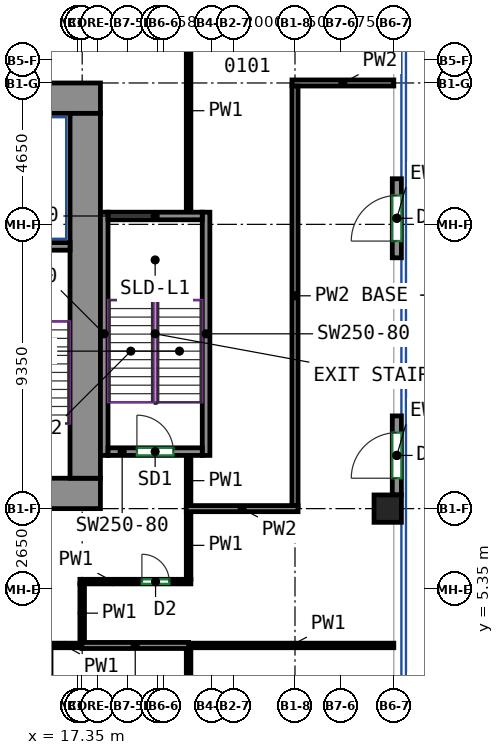
"""IFC4 building model, lengths in metres.
Left out: names, types, materials, properties, quantities, classifications, styles, units other than length and angle.
Written with IfcOpenShell. Run it as: python <this file> out.ifc"""

import sys

from ifc_helpers import new_model, si_unit, direction, frame, frame_2d, origin, origin_2d, place, context, subcontext, project, spatial, rectangle, extrude, source, transform, mapped, element, fill, save


model = new_model("IFC4")
c1 = context("Model", 3, precision=1e-05, world=origin(), true_north=direction((0.0, 1.0)))
c2 = subcontext(c1, "Body", "Model", "MODEL_VIEW")
j1 = project(units=[si_unit("LENGTHUNIT", "METRE"), si_unit("PLANEANGLEUNIT", "RADIAN")], contexts=[c1])
p1 = place(None, origin())
s1 = spatial("IfcSite", under=j1, at=p1, CompositionType="ELEMENT")
p2 = place(p1, origin())
s2 = spatial("IfcBuilding", under=s1, at=p2, CompositionType="ELEMENT")
p3 = place(p2, frame((0.0, 0.0, 9.0)))
s3 = spatial("IfcBuildingStorey", under=s2, at=p3, CompositionType="ELEMENT", Elevation=9.0)
m1 = source(origin(), c2, "Body", "SweptSolid", [
    extrude(rectangle(XDim=0.9, YDim=0.9, at=origin_2d()), origin(), (0.0, 0.0, 1.0), 4.1),
])
p4 = place(p3, frame((27.55, 8.0, 0.0), z_axis=(0.0, 0.0, 1.0), x_axis=(1.0, 0.0, 0.0)))
e1 = element("IfcColumn", 1, at=p4, inside=s3, PredefinedType="COLUMN", context=c2, shape_type="MappedRepresentation", body=[
    mapped(m1, transform((0.0, 0.0, 0.0))),
])
m2 = source(origin(), c2, "Body", "SweptSolid", [
    extrude(rectangle(XDim=5.63, YDim=1.0, at=frame_2d((2.815, 0.0))), origin(), (0.0, 0.0, 1.0), 4.1),
])
p5 = place(p3, frame((12.47, 8.5, 0.0), z_axis=(0.0, 0.0, 1.0), x_axis=(1.0, 0.0, 0.0)))
e2 = element("IfcWall", 2, at=p5, inside=s3, PredefinedType="SHEAR", context=c2, shape_type="MappedRepresentation", body=[
    mapped(m2, transform((0.0, 0.0, 0.0))),
])
p6 = place(p5, frame((2.18, 0.0, 0.0)))
e3 = element("IfcOpeningElement", 3, at=p6, cuts=e2, PredefinedType="OPENING", context=c2, shape_type="SweptSolid", body=[
    extrude(rectangle(XDim=1.2, YDim=2.1, at=frame_2d((0.6, 1.05))), frame((0.0, 0.51, 0.0), z_axis=(0.0, -1.0, 0.0), x_axis=(1.0, 0.0, 0.0)), (0.0, 0.0, 1.0), 1.02),
])
m3 = source(origin(), c2, "Body", "SweptSolid", [
    extrude(rectangle(XDim=34.1, YDim=1.0, at=frame_2d((17.05, 0.0))), origin(), (0.0, 0.0, 1.0), 4.1),
])
p7 = place(p3, frame((-16.0, 21.5, 0.0), z_axis=(0.0, 0.0, 1.0), x_axis=(1.0, 0.0, 0.0)))
e4 = element("IfcWall", 4, at=p7, inside=s3, PredefinedType="SHEAR", context=c2, shape_type="MappedRepresentation", body=[
    mapped(m3, transform((0.0, 0.0, 0.0))),
])
p8 = place(p7, frame((6.831, 0.0, 0.0)))
e5 = element("IfcOpeningElement", 5, at=p8, cuts=e4, PredefinedType="OPENING", context=c2, shape_type="SweptSolid", body=[
    extrude(rectangle(XDim=0.9, YDim=2.1, at=frame_2d((0.45, 1.05))), frame((0.0, 0.51, 0.0), z_axis=(0.0, -1.0, 0.0), x_axis=(1.0, 0.0, 0.0)), (0.0, 0.0, 1.0), 1.02),
])
p9 = place(p7, frame((12.138, 0.0, 0.0)))
e6 = element("IfcOpeningElement", 6, at=p9, cuts=e4, PredefinedType="OPENING", context=c2, shape_type="SweptSolid", body=[
    extrude(rectangle(XDim=0.9, YDim=2.1, at=frame_2d((0.45, 1.05))), frame((0.0, 0.51, 0.0), z_axis=(0.0, -1.0, 0.0), x_axis=(1.0, 0.0, 0.0)), (0.0, 0.0, 1.0), 1.02),
])
p10 = place(p7, frame((17.565, 0.0, 0.0)))
e7 = element("IfcOpeningElement", 7, at=p10, cuts=e4, PredefinedType="OPENING", context=c2, shape_type="SweptSolid", body=[
    extrude(rectangle(XDim=0.9, YDim=2.1, at=frame_2d((0.45, 1.05))), frame((0.0, 0.51, 0.0), z_axis=(0.0, -1.0, 0.0), x_axis=(1.0, 0.0, 0.0)), (0.0, 0.0, 1.0), 1.02),
])
p11 = place(p7, frame((21.786, 0.0, 0.0)))
e8 = element("IfcOpeningElement", 8, at=p11, cuts=e4, PredefinedType="OPENING", context=c2, shape_type="SweptSolid", body=[
    extrude(rectangle(XDim=0.9, YDim=2.1, at=frame_2d((0.45, 1.05))), frame((0.0, 0.51, 0.0), z_axis=(0.0, -1.0, 0.0), x_axis=(1.0, 0.0, 0.0)), (0.0, 0.0, 1.0), 1.02),
])
p12 = place(p7, frame((26.127, 0.0, 0.0)))
e9 = element("IfcOpeningElement", 9, at=p12, cuts=e4, PredefinedType="OPENING", context=c2, shape_type="SweptSolid", body=[
    extrude(rectangle(XDim=0.9, YDim=2.1, at=frame_2d((0.45, 1.05))), frame((0.0, 0.51, 0.0), z_axis=(0.0, -1.0, 0.0), x_axis=(1.0, 0.0, 0.0)), (0.0, 0.0, 1.0), 1.02),
])
p13 = place(p7, frame((2.525, 0.0, 0.0)))
e10 = element("IfcOpeningElement", 10, at=p13, cuts=e4, PredefinedType="OPENING", context=c2, shape_type="SweptSolid", body=[
    extrude(rectangle(XDim=0.9, YDim=2.1, at=frame_2d((0.45, 1.05))), frame((0.0, 0.51, 0.0), z_axis=(0.0, -1.0, 0.0), x_axis=(1.0, 0.0, 0.0)), (0.0, 0.0, 1.0), 1.02),
])
p14 = place(p7, frame((30.675, 0.0, 0.0)))
e11 = element("IfcOpeningElement", 11, at=p14, cuts=e4, PredefinedType="OPENING", context=c2, shape_type="SweptSolid", body=[
    extrude(rectangle(XDim=0.9, YDim=2.1, at=frame_2d((0.45, 1.05))), frame((0.0, 0.51, 0.0), z_axis=(0.0, -1.0, 0.0), x_axis=(1.0, 0.0, 0.0)), (0.0, 0.0, 1.0), 1.02),
])
m4 = source(origin(), c2, "Body", "SweptSolid", [
    extrude(rectangle(XDim=12.0, YDim=1.0, at=frame_2d((6.0, 0.0))), origin(), (0.0, 0.0, 1.0), 4.1),
])
p15 = place(p3, frame((17.6, 9.0, 0.0), z_axis=(0.0, 0.0, 1.0), x_axis=(0.0, 1.0, 0.0)))
e12 = element("IfcWall", 12, at=p15, inside=s3, PredefinedType="SHEAR", context=c2, shape_type="MappedRepresentation", body=[
    mapped(m4, transform((0.0, 0.0, 0.0))),
])
m5 = source(origin(), c2, "Body", "SweptSolid", [
    extrude(rectangle(XDim=3.7, YDim=0.25, at=frame_2d((1.85, 0.0))), origin(), (0.0, 0.0, 1.0), 4.1),
])
p16 = place(p3, frame((13.4, 16.625, 0.0), z_axis=(0.0, 0.0, 1.0), x_axis=(1.0, 0.0, 0.0)))
e13 = element("IfcWall", 13, at=p16, inside=s3, PredefinedType="SHEAR", context=c2, shape_type="MappedRepresentation", body=[
    mapped(m5, transform((0.0, 0.0, 0.0))),
])
m6 = source(origin(), c2, "Body", "SweptSolid", [
    extrude(rectangle(XDim=8.0, YDim=0.25, at=frame_2d((4.0, 0.0))), origin(), (0.0, 0.0, 1.0), 4.1),
])
for number, where, z_axis, x_axis in (
    (14, (18.225, 9.75, 0.0), (0.0, 0.0, 1.0), (0.0, 1.0, 0.0)),
    (15, (21.575, 9.75, 0.0), (0.0, 0.0, 1.0), (0.0, 1.0, 0.0)),
):
    element("IfcWall", number, at=place(p3, frame(where, z_axis=z_axis, x_axis=x_axis)), inside=s3, PredefinedType="SHEAR", context=c2, shape_type="MappedRepresentation", body=[
        mapped(m6, transform((0.0, 0.0, 0.0))),
    ])
m7 = source(origin(), c2, "Body", "SweptSolid", [
    extrude(rectangle(XDim=3.1, YDim=0.25, at=frame_2d((1.55, 0.0))), origin(), (0.0, 0.0, 1.0), 4.1),
])
p17 = place(p3, frame((18.35, 9.875, 0.0), z_axis=(0.0, 0.0, 1.0), x_axis=(1.0, 0.0, 0.0)))
e16 = element("IfcWall", 16, at=p17, inside=s3, PredefinedType="SHEAR", context=c2, shape_type="MappedRepresentation", body=[
    mapped(m7, transform((0.0, 0.0, 0.0))),
])
p18 = place(p17, frame((0.95, 0.0, 0.0)))
e17 = element("IfcOpeningElement", 17, at=p18, cuts=e16, PredefinedType="OPENING", context=c2, shape_type="SweptSolid", body=[
    extrude(rectangle(XDim=1.2, YDim=2.1, at=frame_2d((0.6, 1.05))), frame((0.0, 0.135, 0.0), z_axis=(0.0, -1.0, 0.0), x_axis=(1.0, 0.0, 0.0)), (0.0, 0.0, 1.0), 0.27),
])
p19 = place(p3, frame((18.35, 17.625, 0.0), z_axis=(0.0, 0.0, 1.0), x_axis=(1.0, 0.0, 0.0)))
e18 = element("IfcWall", 18, at=p19, inside=s3, PredefinedType="SHEAR", context=c2, shape_type="MappedRepresentation", body=[
    mapped(m7, transform((0.0, 0.0, 0.0))),
])
m8 = source(origin(), c2, "Body", "SweptSolid", [
    extrude(rectangle(XDim=2.6, YDim=0.3, at=frame_2d((1.3, 0.0))), origin(), (0.0, 0.0, 1.0), 4.1),
])
p20 = place(p3, frame((27.85, 8.45, 0.0), z_axis=(0.0, 0.0, 1.0), x_axis=(0.0, 1.0, 0.0)))
e19 = element("IfcWall", 19, at=p20, inside=s3, PredefinedType="SOLIDWALL", context=c2, shape_type="MappedRepresentation", body=[
    mapped(m8, transform((0.0, 0.0, 0.0))),
])
p21 = place(p20, frame((0.55, 0.0, 0.0)))
e20 = element("IfcOpeningElement", 20, at=p21, cuts=e19, PredefinedType="OPENING", context=c2, shape_type="SweptSolid", body=[
    extrude(rectangle(XDim=1.5, YDim=2.4, at=frame_2d((0.75, 1.2))), frame((0.0, 0.16, 0.0), z_axis=(0.0, -1.0, 0.0), x_axis=(1.0, 0.0, 0.0)), (0.0, 0.0, 1.0), 0.32),
])
p22 = place(p3, frame((27.85, 16.25, 0.0), z_axis=(0.0, 0.0, 1.0), x_axis=(0.0, 1.0, 0.0)))
e21 = element("IfcWall", 21, at=p22, inside=s3, PredefinedType="SOLIDWALL", context=c2, shape_type="MappedRepresentation", body=[
    mapped(m8, transform((0.0, 0.0, 0.0))),
])
p23 = place(p22, frame((0.55, 0.0, 0.0)))
e22 = element("IfcOpeningElement", 22, at=p23, cuts=e21, PredefinedType="OPENING", context=c2, shape_type="SweptSolid", body=[
    extrude(rectangle(XDim=1.5, YDim=2.4, at=frame_2d((0.75, 1.2))), frame((0.0, 0.16, 0.0), z_axis=(0.0, -1.0, 0.0), x_axis=(1.0, 0.0, 0.0)), (0.0, 0.0, 1.0), 0.32),
])
p24 = place(p3, frame((21.0, -5.434, 0.0), z_axis=(0.0, 0.0, 1.0), x_axis=(0.0, 1.0, 0.0)))
e23 = element("IfcWall", 23, at=p24, inside=s3, PredefinedType="PARTITIONING", context=c2, shape_type="SweptSolid", body=[
    extrude(rectangle(XDim=8.834, YDim=0.15, at=frame_2d((4.417, 0.0))), origin(), (0.0, 0.0, 1.0), 4.1),
])
p25 = place(p3, frame((20.999, 3.5, 0.0), z_axis=(0.0, 0.0, 1.0), x_axis=(1.0, 0.0, 0.0)))
e24 = element("IfcWall", 24, at=p25, inside=s3, PredefinedType="PARTITIONING", context=c2, shape_type="SweptSolid", body=[
    extrude(rectangle(XDim=6.751, YDim=0.15, at=frame_2d((3.375, 0.0))), origin(), (0.0, 0.0, 1.0), 4.1),
])
p26 = place(p3, frame((21.0, 8.09, 0.0), z_axis=(0.0, 0.0, 1.0), x_axis=(0.0, 1.0, 0.0)))
e25 = element("IfcWall", 25, at=p26, inside=s3, PredefinedType="PARTITIONING", context=c2, shape_type="SweptSolid", body=[
    extrude(rectangle(XDim=1.66, YDim=0.15, at=frame_2d((0.83, 0.0))), origin(), (0.0, 0.0, 1.0), 4.1),
])
p27 = place(p3, frame((21.0, 17.75, 0.0), z_axis=(0.0, 0.0, 1.0), x_axis=(0.0, 1.0, 0.0)))
e26 = element("IfcWall", 26, at=p27, inside=s3, PredefinedType="PARTITIONING", context=c2, shape_type="SweptSolid", body=[
    extrude(rectangle(XDim=6.675, YDim=0.15, at=frame_2d((3.337, 0.0))), origin(), (0.0, 0.0, 1.0), 4.1),
])
p28 = place(p3, frame((16.325, 3.5, 0.0), z_axis=(0.0, 0.0, 1.0), x_axis=(1.0, 0.0, 0.0)))
e27 = element("IfcWall", 27, at=p28, inside=s3, PredefinedType="PARTITIONING", context=c2, shape_type="SweptSolid", body=[
    extrude(rectangle(XDim=1.166, YDim=0.15, at=frame_2d((0.583, 0.0))), origin(), (0.0, 0.0, 1.0), 4.1),
])
p29 = place(p3, frame((21.0, 5.675, 0.0), z_axis=(0.0, 0.0, 1.0), x_axis=(0.0, 1.0, 0.0)))
e28 = element("IfcWall", 28, at=p29, inside=s3, PredefinedType="PARTITIONING", context=c2, shape_type="SweptSolid", body=[
    extrude(rectangle(XDim=2.235, YDim=0.15, at=frame_2d((1.117, 0.0))), origin(), (0.0, 0.0, 1.0), 4.1),
])
p30 = place(p3, frame((17.425, 5.6, 0.0), z_axis=(0.0, 0.0, 1.0), x_axis=(1.0, 0.0, 0.0)))
e29 = element("IfcWall", 29, at=p30, inside=s3, PredefinedType="PARTITIONING", context=c2, shape_type="SweptSolid", body=[
    extrude(rectangle(XDim=3.65, YDim=0.15, at=frame_2d((1.825, 0.0))), origin(), (0.0, 0.0, 1.0), 4.1),
])
p31 = place(p30, frame((2.039, 0.0, 0.0)))
e30 = element("IfcOpeningElement", 30, at=p31, cuts=e29, PredefinedType="OPENING", context=c2, shape_type="SweptSolid", body=[
    extrude(rectangle(XDim=0.9, YDim=2.1, at=frame_2d((0.45, 1.05))), frame((0.0, 0.085, 0.0), z_axis=(0.0, -1.0, 0.0), x_axis=(1.0, 0.0, 0.0)), (0.0, 0.0, 1.0), 0.17),
])
p32 = place(p3, frame((17.5, 3.599, 0.0), z_axis=(0.0, 0.0, 1.0), x_axis=(0.0, 1.0, 0.0)))
e31 = element("IfcWall", 31, at=p32, inside=s3, PredefinedType="PARTITIONING", context=c2, shape_type="SweptSolid", body=[
    extrude(rectangle(XDim=1.926, YDim=0.15, at=frame_2d((0.963, 0.0))), origin(), (0.0, 0.0, 1.0), 4.1),
])
p33 = place(p3, frame((24.4, 22.0, 0.0), z_axis=(0.0, 0.0, 1.0), x_axis=(1.0, 0.0, 0.0)))
e32 = element("IfcWall", 32, at=p33, inside=s3, PredefinedType="PARTITIONING", context=c2, shape_type="SweptSolid", body=[
    extrude(rectangle(XDim=3.35, YDim=0.2, at=frame_2d((1.675, 0.0))), origin(), (0.0, 0.0, 1.0), 4.1),
])
p34 = place(p3, frame((24.5, 8.1, 0.0), z_axis=(0.0, 0.0, 1.0), x_axis=(0.0, 1.0, 0.0)))
e33 = element("IfcWall", 33, at=p34, inside=s3, PredefinedType="PARTITIONING", context=c2, shape_type="SweptSolid", body=[
    extrude(rectangle(XDim=13.8, YDim=0.2, at=frame_2d((6.9, 0.0))), origin(), (0.0, 0.0, 1.0), 3.45),
])
p35 = place(p3, frame((20.926, 8.0, 0.0), z_axis=(0.0, 0.0, 1.0), x_axis=(1.0, 0.0, 0.0)))
e34 = element("IfcWall", 34, at=p35, inside=s3, PredefinedType="PARTITIONING", context=c2, shape_type="SweptSolid", body=[
    extrude(rectangle(XDim=3.674, YDim=0.2, at=frame_2d((1.837, 0.0))), origin(), (0.0, 0.0, 1.0), 4.1),
])
p36 = place(p3, frame((20.999, 3.5, 0.0), z_axis=(0.0, 0.0, 1.0), x_axis=(-0.999999961253, -0.000278377051, 0.0)))
e35 = element("IfcWall", 35, at=p36, inside=s3, PredefinedType="PARTITIONING", context=c2, shape_type="SweptSolid", body=[
    extrude(rectangle(XDim=3.508, YDim=0.2, at=frame_2d((1.754, 0.0))), origin(), (0.0, 0.0, 1.0), 4.1),
])
p37 = place(p21, origin())
e36 = element("IfcDoor", 36, at=p37, inside=s3, OperationType="DOUBLE_DOOR_SINGLE_SWING", PredefinedType="DOOR", context=c2, shape_type="SweptSolid", body=[
    extrude(rectangle(XDim=1.5, YDim=2.4, at=frame_2d((0.75, 1.2))), frame((0.0, 0.025, 0.0), z_axis=(0.0, -1.0, 0.0), x_axis=(1.0, 0.0, 0.0)), (0.0, 0.0, 1.0), 0.05),
])
fill(e20, e36)
p38 = place(p23, origin())
e37 = element("IfcDoor", 37, at=p38, inside=s3, OperationType="DOUBLE_DOOR_SINGLE_SWING", PredefinedType="DOOR", context=c2, shape_type="SweptSolid", body=[
    extrude(rectangle(XDim=1.5, YDim=2.4, at=frame_2d((0.75, 1.2))), frame((0.0, 0.025, 0.0), z_axis=(0.0, -1.0, 0.0), x_axis=(1.0, 0.0, 0.0)), (0.0, 0.0, 1.0), 0.05),
])
fill(e22, e37)
p39 = place(p18, origin())
e38 = element("IfcDoor", 38, at=p39, inside=s3, OperationType="DOUBLE_DOOR_SINGLE_SWING", PredefinedType="DOOR", context=c2, shape_type="SweptSolid", body=[
    extrude(rectangle(XDim=1.2, YDim=2.1, at=frame_2d((0.6, 1.05))), frame((0.0, 0.025, 0.0), z_axis=(0.0, -1.0, 0.0), x_axis=(1.0, 0.0, 0.0)), (0.0, 0.0, 1.0), 0.05),
])
fill(e17, e38)
p40 = place(p31, origin())
e39 = element("IfcDoor", 39, at=p40, inside=s3, OperationType="SINGLE_SWING_LEFT", PredefinedType="DOOR", context=c2, shape_type="SweptSolid", body=[
    extrude(rectangle(XDim=0.9, YDim=2.1, at=frame_2d((0.45, 1.05))), frame((0.0, 0.025, 0.0), z_axis=(0.0, -1.0, 0.0), x_axis=(1.0, 0.0, 0.0)), (0.0, 0.0, 1.0), 0.05),
])
fill(e30, e39)
save(model, sys.argv[1])
